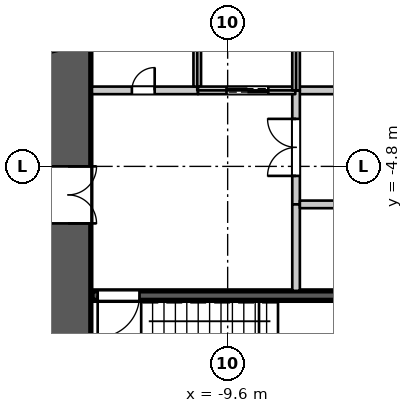
"""IFC4 building model, lengths in metres.
Left out: names, types, materials, properties, quantities, classifications, styles, units other than length and angle.
Written with IfcOpenShell. Run it as: python <this file> out.ifc"""

import sys

from ifc_helpers import new_model, si_unit, direction, frame, frame_2d, origin, place, context, subcontext, project, spatial, rectangle, extrude, element, fill, save


model = new_model("IFC4")
c1 = context("Model", 3, precision=1e-05, world=origin(), true_north=direction((0.0, 1.0)))
c2 = subcontext(c1, "Body", "Model", "MODEL_VIEW")
j1 = project(units=[si_unit("LENGTHUNIT", "METRE"), si_unit("PLANEANGLEUNIT", "RADIAN")], contexts=[c1])
p1 = place(None, origin())
s1 = spatial("IfcSite", under=j1, at=p1, CompositionType="ELEMENT")
p2 = place(p1, origin())
s2 = spatial("IfcBuilding", under=s1, at=p2, CompositionType="ELEMENT")
p3 = place(p2, frame((0.0, 0.0, 21.0)))
s3 = spatial("IfcBuildingStorey", under=s2, at=p3, CompositionType="ELEMENT", Elevation=21.0)
p4 = place(p3, frame((-13.8, -10.8, 0.0), z_axis=(0.0, 0.0, 1.0), x_axis=(0.0, 1.0, 0.0)))
e1 = element("IfcWall", 1, at=p4, inside=s3, PredefinedType="SHEAR", context=c2, shape_type="SweptSolid", body=[
    extrude(rectangle(XDim=21.6, YDim=1.2, at=frame_2d((10.8, 0.0))), origin(), (0.0, 0.0, 1.0), 4.5),
])
p5 = place(p4, frame((15.5, 0.0, 0.0)))
e2 = element("IfcOpeningElement", 2, at=p5, cuts=e1, PredefinedType="OPENING", context=c2, shape_type="SweptSolid", body=[
    extrude(rectangle(XDim=1.5, YDim=2.4, at=frame_2d((0.75, 1.2))), frame((0.0, 0.61, 0.0), z_axis=(0.0, -1.0, 0.0), x_axis=(1.0, 0.0, 0.0)), (0.0, 0.0, 1.0), 1.22),
])
p6 = place(p4, frame((4.5, 0.0, 0.0)))
e3 = element("IfcOpeningElement", 3, at=p6, cuts=e1, PredefinedType="OPENING", context=c2, shape_type="SweptSolid", body=[
    extrude(rectangle(XDim=1.5, YDim=2.4, at=frame_2d((0.75, 1.2))), frame((0.0, 0.61, 0.0), z_axis=(0.0, -1.0, 0.0), x_axis=(1.0, 0.0, 0.0)), (0.0, 0.0, 1.0), 1.22),
])
p7 = place(p3, frame((-7.82, -2.8, 0.0), z_axis=(0.0, 0.0, 1.0), x_axis=(1.0, 0.0, 0.0)))
e4 = element("IfcWall", 4, at=p7, inside=s3, PredefinedType="PARTITIONING", context=c2, shape_type="SweptSolid", body=[
    extrude(rectangle(XDim=9.64, YDim=0.2, at=frame_2d((4.82, 0.0))), origin(), (0.0, 0.0, 1.0), 4.25),
])
p8 = place(p7, frame((2.25, 0.0, 0.0)))
e5 = element("IfcOpeningElement", 5, at=p8, cuts=e4, PredefinedType="OPENING", context=c2, shape_type="SweptSolid", body=[
    extrude(rectangle(XDim=0.9, YDim=2.2, at=frame_2d((0.45, 1.1))), frame((0.0, 0.11, 0.0), z_axis=(0.0, -1.0, 0.0), x_axis=(1.0, 0.0, 0.0)), (0.0, 0.0, 1.0), 0.22),
])
p9 = place(p7, frame((6.9, 0.0, 0.0)))
e6 = element("IfcOpeningElement", 6, at=p9, cuts=e4, PredefinedType="OPENING", context=c2, shape_type="SweptSolid", body=[
    extrude(rectangle(XDim=0.9, YDim=2.2, at=frame_2d((0.45, 1.1))), frame((0.0, 0.11, 0.0), z_axis=(0.0, -1.0, 0.0), x_axis=(1.0, 0.0, 0.0)), (0.0, 0.0, 1.0), 0.22),
])
p10 = place(p3, frame((-7.8, -5.8, 0.0), z_axis=(0.0, 0.0, 1.0), x_axis=(0.0, 1.0, 0.0)))
e7 = element("IfcWall", 7, at=p10, inside=s3, PredefinedType="PARTITIONING", context=c2, shape_type="SweptSolid", body=[
    extrude(rectangle(XDim=3.0, YDim=0.2, at=frame_2d((1.5, 0.0))), origin(), (0.0, 0.0, 1.0), 4.25),
])
p11 = place(p10, frame((0.75, 0.0, 0.0)))
e8 = element("IfcOpeningElement", 8, at=p11, cuts=e7, PredefinedType="OPENING", context=c2, shape_type="SweptSolid", body=[
    extrude(rectangle(XDim=1.5, YDim=2.4, at=frame_2d((0.75, 1.2))), frame((0.0, 0.11, 0.0), z_axis=(0.0, -1.0, 0.0), x_axis=(1.0, 0.0, 0.0)), (0.0, 0.0, 1.0), 0.22),
])
p12 = place(p3, frame((-13.17, -2.8, 0.0), z_axis=(0.0, 0.0, 1.0), x_axis=(1.0, 0.0, 0.0)))
e9 = element("IfcWall", 9, at=p12, inside=s3, PredefinedType="PARTITIONING", context=c2, shape_type="SweptSolid", body=[
    extrude(rectangle(XDim=2.79, YDim=0.2, at=frame_2d((1.395, 0.0))), origin(), (0.0, 0.0, 1.0), 4.25),
])
p13 = place(p12, frame((1.05, 0.0, 0.0)))
e10 = element("IfcOpeningElement", 10, at=p13, cuts=e9, PredefinedType="OPENING", context=c2, shape_type="SweptSolid", body=[
    extrude(rectangle(XDim=0.6, YDim=2.0, at=frame_2d((0.3, 1.0))), frame((0.0, 0.11, 0.0), z_axis=(0.0, -1.0, 0.0), x_axis=(1.0, 0.0, 0.0)), (0.0, 0.0, 1.0), 0.22),
])
p14 = place(p3, frame((-7.8, -8.075, 0.0), z_axis=(0.0, 0.0, 1.0), x_axis=(0.0, 1.0, 0.0)))
e11 = element("IfcWall", 11, at=p14, inside=s3, PredefinedType="PARTITIONING", context=c2, shape_type="SweptSolid", body=[
    extrude(rectangle(XDim=2.275, YDim=0.2, at=frame_2d((1.137, 0.0))), origin(), (0.0, 0.0, 1.0), 4.25),
])
p15 = place(p3, frame((-7.7, -5.8, 0.0), z_axis=(0.0, 0.0, 1.0), x_axis=(1.0, 0.0, 0.0)))
e12 = element("IfcWall", 12, at=p15, inside=s3, PredefinedType="PARTITIONING", context=c2, shape_type="SweptSolid", body=[
    extrude(rectangle(XDim=11.32, YDim=0.2, at=frame_2d((5.66, 0.0))), origin(), (0.0, 0.0, 1.0), 4.25),
])
p16 = place(p15, frame((5.2, 0.0, 0.0)))
e13 = element("IfcOpeningElement", 13, at=p16, cuts=e12, PredefinedType="OPENING", context=c2, shape_type="SweptSolid", body=[
    extrude(rectangle(XDim=0.9, YDim=2.2, at=frame_2d((0.45, 1.1))), frame((0.0, 0.11, 0.0), z_axis=(0.0, -1.0, 0.0), x_axis=(1.0, 0.0, 0.0)), (0.0, 0.0, 1.0), 0.22),
])
p17 = place(p3, frame((-10.4, -2.7, 0.0), z_axis=(0.0, 0.0, 1.0), x_axis=(0.0, 1.0, 0.0)))
e14 = element("IfcWall", 14, at=p17, inside=s3, PredefinedType="PARTITIONING", context=c2, shape_type="SweptSolid", body=[
    extrude(rectangle(XDim=2.7, YDim=0.2, at=frame_2d((1.35, 0.0))), origin(), (0.0, 0.0, 1.0), 4.25),
])
p18 = place(p3, frame((-10.38, -2.8, 0.0), z_axis=(0.0, 0.0, 1.0), x_axis=(1.0, 0.0, 0.0)))
e15 = element("IfcWall", 15, at=p18, inside=s3, PredefinedType="PARTITIONING", context=c2, shape_type="SweptSolid", body=[
    extrude(rectangle(XDim=2.56, YDim=0.2, at=frame_2d((1.28, 0.0))), origin(), (0.0, 0.0, 1.0), 4.25),
])
p19 = place(p18, frame((0.75, 0.0, 0.0)))
e16 = element("IfcOpeningElement", 16, at=p19, cuts=e15, PredefinedType="OPENING", context=c2, shape_type="SweptSolid", body=[
    extrude(rectangle(XDim=1.1, YDim=2.2, at=frame_2d((0.55, 1.1))), frame((0.0, 0.11, 0.0), z_axis=(0.0, -1.0, 0.0), x_axis=(1.0, 0.0, 0.0)), (0.0, 0.0, 1.0), 0.22),
])
p20 = place(p3, frame((-7.8, -2.8, 0.0), z_axis=(0.0, 0.0, 1.0), x_axis=(0.0, 1.0, 0.0)))
e17 = element("IfcWall", 17, at=p20, inside=s3, PredefinedType="PARTITIONING", context=c2, shape_type="SweptSolid", body=[
    extrude(rectangle(XDim=2.8, YDim=0.2, at=frame_2d((1.4, 0.0))), origin(), (0.0, 0.0, 1.0), 4.25),
])
p21 = place(p3, frame((-13.17, -8.2, 0.0), z_axis=(0.0, 0.0, 1.0), x_axis=(1.0, 0.0, 0.0)))
e18 = element("IfcWall", 18, at=p21, inside=s3, PredefinedType="SHEAR", context=c2, shape_type="SweptSolid", body=[
    extrude(rectangle(XDim=7.895, YDim=0.25, at=frame_2d((3.948, 0.0))), origin(), (0.0, 0.0, 1.0), 4.25),
])
p22 = place(p21, frame((0.15, 0.0, 0.0)))
e19 = element("IfcOpeningElement", 19, at=p22, cuts=e18, PredefinedType="OPENING", context=c2, shape_type="SweptSolid", body=[
    extrude(rectangle(XDim=1.1, YDim=2.2, at=frame_2d((0.55, 1.1))), frame((0.0, 0.135, 0.0), z_axis=(0.0, -1.0, 0.0), x_axis=(1.0, 0.0, 0.0)), (0.0, 0.0, 1.0), 0.27),
])
p23 = place(p13, origin())
e20 = element("IfcDoor", 20, at=p23, inside=s3, OperationType="SINGLE_SWING_RIGHT", PredefinedType="DOOR", context=c2, shape_type="SweptSolid", body=[
    extrude(rectangle(XDim=0.6, YDim=2.0, at=frame_2d((0.3, 1.0))), frame((0.0, 0.025, 0.0), z_axis=(0.0, -1.0, 0.0), x_axis=(1.0, 0.0, 0.0)), (0.0, 0.0, 1.0), 0.05),
])
fill(e10, e20)
p24 = place(p19, origin())
e21 = element("IfcDoor", 21, at=p24, inside=s3, OperationType="DOUBLE_DOOR_SLIDING", PredefinedType="DOOR", context=c2, shape_type="SweptSolid", body=[
    extrude(rectangle(XDim=1.1, YDim=2.2, at=frame_2d((0.55, 1.1))), frame((0.0, 0.025, 0.0), z_axis=(0.0, -1.0, 0.0), x_axis=(1.0, 0.0, 0.0)), (0.0, 0.0, 1.0), 0.05),
])
fill(e16, e21)
p25 = place(p22, origin())
e22 = element("IfcDoor", 22, at=p25, inside=s3, OperationType="SINGLE_SWING_RIGHT", PredefinedType="DOOR", context=c2, shape_type="SweptSolid", body=[
    extrude(rectangle(XDim=1.1, YDim=2.2, at=frame_2d((0.55, 1.1))), frame((0.0, 0.025, 0.0), z_axis=(0.0, -1.0, 0.0), x_axis=(1.0, 0.0, 0.0)), (0.0, 0.0, 1.0), 0.05),
])
fill(e19, e22)
p26 = place(p11, origin())
e23 = element("IfcDoor", 23, at=p26, inside=s3, OperationType="DOUBLE_DOOR_SINGLE_SWING", PredefinedType="DOOR", context=c2, shape_type="SweptSolid", body=[
    extrude(rectangle(XDim=1.5, YDim=2.4, at=frame_2d((0.75, 1.2))), frame((0.0, 0.025, 0.0), z_axis=(0.0, -1.0, 0.0), x_axis=(1.0, 0.0, 0.0)), (0.0, 0.0, 1.0), 0.05),
])
fill(e8, e23)
p27 = place(p6, origin())
e24 = element("IfcDoor", 24, at=p27, inside=s3, OperationType="DOUBLE_DOOR_SINGLE_SWING", PredefinedType="DOOR", context=c2, shape_type="SweptSolid", body=[
    extrude(rectangle(XDim=1.5, YDim=2.4, at=frame_2d((0.75, 1.2))), frame((0.0, 0.025, 0.0), z_axis=(0.0, -1.0, 0.0), x_axis=(1.0, 0.0, 0.0)), (0.0, 0.0, 1.0), 0.05),
])
fill(e3, e24)
save(model, sys.argv[1])
